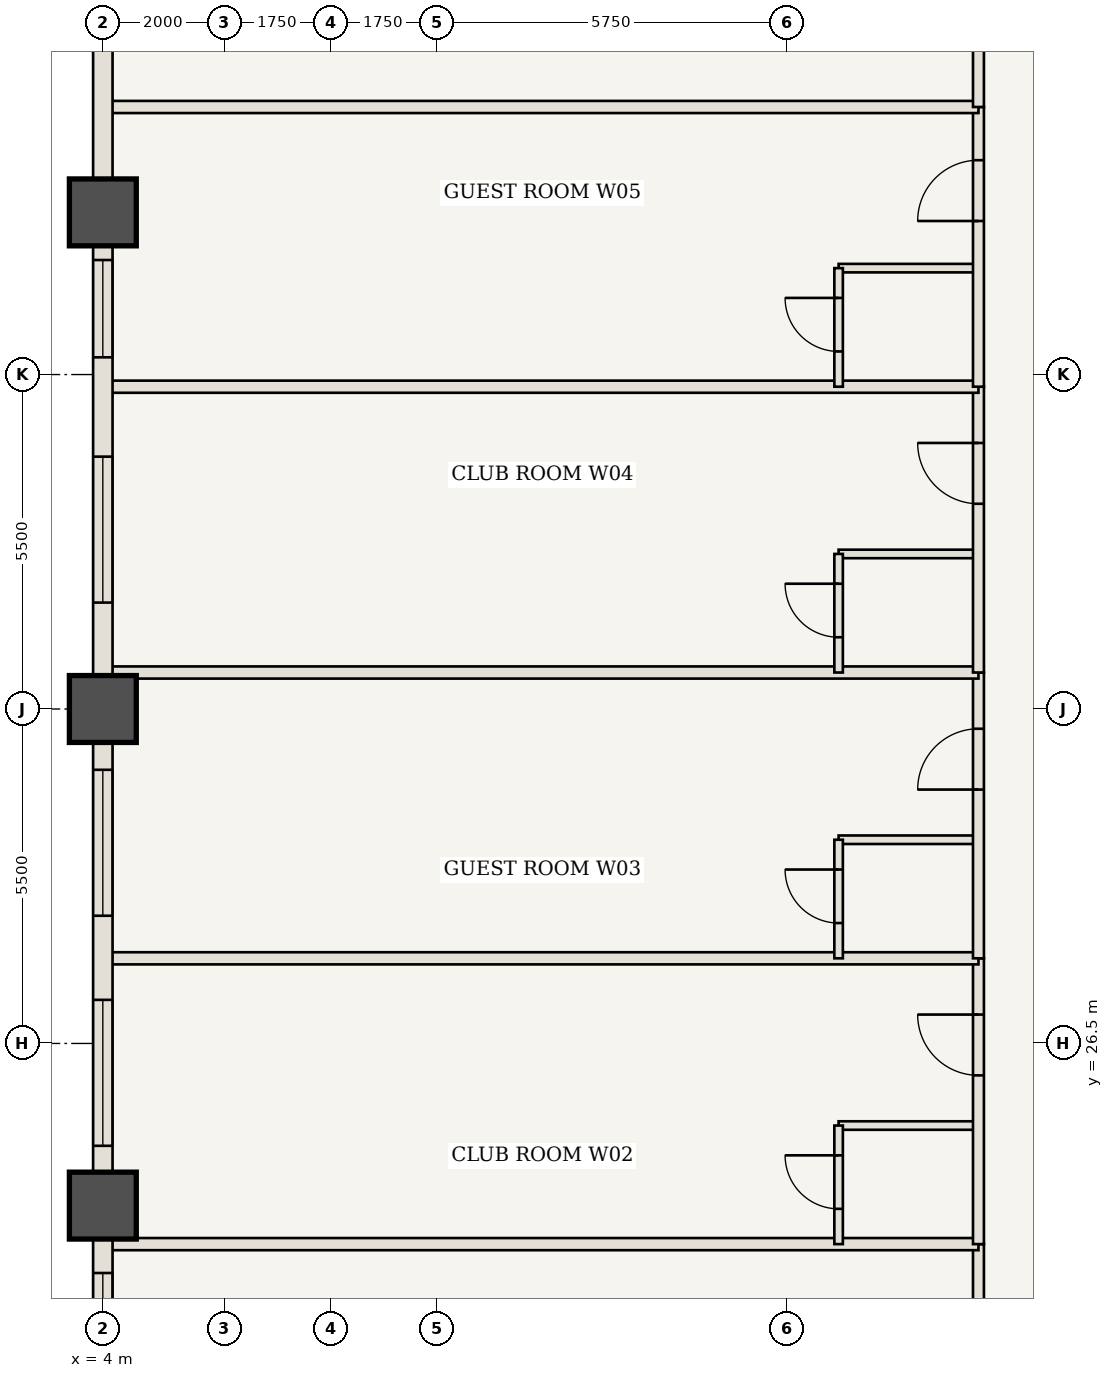
"""IFC4 building model, lengths in metres.
Left out: names, types, materials, properties, quantities, classifications, styles, units other than length and angle.
Written with IfcOpenShell. Run it as: python <this file> out.ifc"""

import sys

from ifc_helpers import new_model, si_unit, direction, frame, frame_2d, origin, origin_2d, place, context, subcontext, project, spatial, rectangle, extrude, element, fill, save


model = new_model("IFC4")
c1 = context("Model", 3, precision=1e-05, world=origin(), true_north=direction((0.0, 1.0)))
c2 = subcontext(c1, "Body", "Model", "MODEL_VIEW")
j1 = project(units=[si_unit("LENGTHUNIT", "METRE"), si_unit("PLANEANGLEUNIT", "RADIAN")], contexts=[c1])
p1 = place(None, origin())
s1 = spatial("IfcSite", under=j1, at=p1, CompositionType="ELEMENT")
p2 = place(p1, origin())
s2 = spatial("IfcBuilding", under=s1, at=p2, CompositionType="ELEMENT")
p3 = place(p2, frame((0.0, 0.0, 45.85)))
s3 = spatial("IfcBuildingStorey", under=s2, at=p3, CompositionType="ELEMENT", Elevation=45.85)
for number, where, z_axis, x_axis in (
    (1, (4.0, 23.833, 0.0), (0.0, 0.0, 1.0), (1.0, 0.0, 0.0)),
    (2, (4.0, 32.0, 0.0), (0.0, 0.0, 1.0), (1.0, 0.0, 0.0)),
    (3, (4.0, 40.167, 0.0), (0.0, 0.0, 1.0), (1.0, 0.0, 0.0)),
):
    element("IfcColumn", number, at=place(p3, frame(where, z_axis=z_axis, x_axis=x_axis)), inside=s3, PredefinedType="COLUMN", context=c2, shape_type="SweptSolid", body=[
        extrude(rectangle(XDim=1.1, YDim=1.1, at=origin_2d()), origin(), (0.0, 0.0, 1.0), 3.5),
    ])
p4 = place(p3, frame((18.4, 18.4, 0.0), z_axis=(0.0, 0.0, 1.0), x_axis=(0.0, 1.0, 0.0)))
e4 = element("IfcWall", 4, at=p4, inside=s3, PredefinedType="STANDARD", context=c2, shape_type="SweptSolid", body=[
    extrude(rectangle(XDim=4.8, YDim=0.18, at=frame_2d((2.4, 0.0))), origin(), (0.0, 0.0, 1.0), 3.32),
])
p5 = place(p4, frame((2.825, 0.0, 0.0)))
e5 = element("IfcOpeningElement", 5, at=p5, cuts=e4, PredefinedType="OPENING", context=c2, shape_type="SweptSolid", body=[
    extrude(rectangle(XDim=1.0, YDim=2.15, at=frame_2d((0.5, 1.075))), frame((0.0, 0.1, 0.0), z_axis=(0.0, -1.0, 0.0), x_axis=(1.0, 0.0, 0.0)), (0.0, 0.0, 1.0), 0.2),
])
p6 = place(p3, frame((4.06, 23.2, 0.0), z_axis=(0.0, 0.0, 1.0), x_axis=(1.0, 0.0, 0.0)))
e6 = element("IfcWall", 6, at=p6, inside=s3, PredefinedType="STANDARD", context=c2, shape_type="SweptSolid", body=[
    extrude(rectangle(XDim=14.34, YDim=0.2, at=frame_2d((7.17, 0.0))), origin(), (0.0, 0.0, 1.0), 3.32),
])
p7 = place(p3, frame((16.1, 25.15, 0.0), z_axis=(0.0, 0.0, 1.0), x_axis=(1.0, 0.0, 0.0)))
e7 = element("IfcWall", 7, at=p7, inside=s3, PredefinedType="STANDARD", context=c2, shape_type="SweptSolid", body=[
    extrude(rectangle(XDim=2.3, YDim=0.14, at=frame_2d((1.15, 0.0))), origin(), (0.0, 0.0, 1.0), 3.32),
])
p8 = place(p3, frame((16.1, 23.2, 0.0), z_axis=(0.0, 0.0, 1.0), x_axis=(0.0, 1.0, 0.0)))
e8 = element("IfcWall", 8, at=p8, inside=s3, PredefinedType="STANDARD", context=c2, shape_type="SweptSolid", body=[
    extrude(rectangle(XDim=1.95, YDim=0.14, at=frame_2d((0.975, 0.0))), origin(), (0.0, 0.0, 1.0), 3.32),
])
p9 = place(p8, frame((0.58, 0.0, 0.0)))
e9 = element("IfcOpeningElement", 9, at=p9, cuts=e8, PredefinedType="OPENING", context=c2, shape_type="SweptSolid", body=[
    extrude(rectangle(XDim=0.88, YDim=2.1, at=frame_2d((0.44, 1.05))), frame((0.0, 0.08, 0.0), z_axis=(0.0, -1.0, 0.0), x_axis=(1.0, 0.0, 0.0)), (0.0, 0.0, 1.0), 0.16),
])
p10 = place(p3, frame((18.4, 23.2, 0.0), z_axis=(0.0, 0.0, 1.0), x_axis=(0.0, 1.0, 0.0)))
e10 = element("IfcWall", 10, at=p10, inside=s3, PredefinedType="STANDARD", context=c2, shape_type="SweptSolid", body=[
    extrude(rectangle(XDim=4.7, YDim=0.18, at=frame_2d((2.35, 0.0))), origin(), (0.0, 0.0, 1.0), 3.32),
])
p11 = place(p10, frame((2.775, 0.0, 0.0)))
e11 = element("IfcOpeningElement", 11, at=p11, cuts=e10, PredefinedType="OPENING", context=c2, shape_type="SweptSolid", body=[
    extrude(rectangle(XDim=1.0, YDim=2.15, at=frame_2d((0.5, 1.075))), frame((0.0, 0.1, 0.0), z_axis=(0.0, -1.0, 0.0), x_axis=(1.0, 0.0, 0.0)), (0.0, 0.0, 1.0), 0.2),
])
p12 = place(p3, frame((4.06, 27.9, 0.0), z_axis=(0.0, 0.0, 1.0), x_axis=(1.0, 0.0, 0.0)))
e12 = element("IfcWall", 12, at=p12, inside=s3, PredefinedType="STANDARD", context=c2, shape_type="SweptSolid", body=[
    extrude(rectangle(XDim=14.34, YDim=0.2, at=frame_2d((7.17, 0.0))), origin(), (0.0, 0.0, 1.0), 3.32),
])
p13 = place(p3, frame((16.1, 29.85, 0.0), z_axis=(0.0, 0.0, 1.0), x_axis=(1.0, 0.0, 0.0)))
e13 = element("IfcWall", 13, at=p13, inside=s3, PredefinedType="STANDARD", context=c2, shape_type="SweptSolid", body=[
    extrude(rectangle(XDim=2.3, YDim=0.14, at=frame_2d((1.15, 0.0))), origin(), (0.0, 0.0, 1.0), 3.32),
])
p14 = place(p3, frame((16.1, 27.9, 0.0), z_axis=(0.0, 0.0, 1.0), x_axis=(0.0, 1.0, 0.0)))
e14 = element("IfcWall", 14, at=p14, inside=s3, PredefinedType="STANDARD", context=c2, shape_type="SweptSolid", body=[
    extrude(rectangle(XDim=1.95, YDim=0.14, at=frame_2d((0.975, 0.0))), origin(), (0.0, 0.0, 1.0), 3.32),
])
p15 = place(p14, frame((0.58, 0.0, 0.0)))
e15 = element("IfcOpeningElement", 15, at=p15, cuts=e14, PredefinedType="OPENING", context=c2, shape_type="SweptSolid", body=[
    extrude(rectangle(XDim=0.88, YDim=2.1, at=frame_2d((0.44, 1.05))), frame((0.0, 0.08, 0.0), z_axis=(0.0, -1.0, 0.0), x_axis=(1.0, 0.0, 0.0)), (0.0, 0.0, 1.0), 0.16),
])
p16 = place(p3, frame((18.4, 27.9, 0.0), z_axis=(0.0, 0.0, 1.0), x_axis=(0.0, 1.0, 0.0)))
e16 = element("IfcWall", 16, at=p16, inside=s3, PredefinedType="STANDARD", context=c2, shape_type="SweptSolid", body=[
    extrude(rectangle(XDim=4.7, YDim=0.18, at=frame_2d((2.35, 0.0))), origin(), (0.0, 0.0, 1.0), 3.32),
])
p17 = place(p16, frame((2.775, 0.0, 0.0)))
e17 = element("IfcOpeningElement", 17, at=p17, cuts=e16, PredefinedType="OPENING", context=c2, shape_type="SweptSolid", body=[
    extrude(rectangle(XDim=1.0, YDim=2.15, at=frame_2d((0.5, 1.075))), frame((0.0, 0.1, 0.0), z_axis=(0.0, -1.0, 0.0), x_axis=(1.0, 0.0, 0.0)), (0.0, 0.0, 1.0), 0.2),
])
p18 = place(p3, frame((4.06, 32.6, 0.0), z_axis=(0.0, 0.0, 1.0), x_axis=(1.0, 0.0, 0.0)))
e18 = element("IfcWall", 18, at=p18, inside=s3, PredefinedType="STANDARD", context=c2, shape_type="SweptSolid", body=[
    extrude(rectangle(XDim=14.34, YDim=0.2, at=frame_2d((7.17, 0.0))), origin(), (0.0, 0.0, 1.0), 3.32),
])
p19 = place(p3, frame((16.1, 34.55, 0.0), z_axis=(0.0, 0.0, 1.0), x_axis=(1.0, 0.0, 0.0)))
e19 = element("IfcWall", 19, at=p19, inside=s3, PredefinedType="STANDARD", context=c2, shape_type="SweptSolid", body=[
    extrude(rectangle(XDim=2.3, YDim=0.14, at=frame_2d((1.15, 0.0))), origin(), (0.0, 0.0, 1.0), 3.32),
])
p20 = place(p3, frame((16.1, 32.6, 0.0), z_axis=(0.0, 0.0, 1.0), x_axis=(0.0, 1.0, 0.0)))
e20 = element("IfcWall", 20, at=p20, inside=s3, PredefinedType="STANDARD", context=c2, shape_type="SweptSolid", body=[
    extrude(rectangle(XDim=1.95, YDim=0.14, at=frame_2d((0.975, 0.0))), origin(), (0.0, 0.0, 1.0), 3.32),
])
p21 = place(p20, frame((0.58, 0.0, 0.0)))
e21 = element("IfcOpeningElement", 21, at=p21, cuts=e20, PredefinedType="OPENING", context=c2, shape_type="SweptSolid", body=[
    extrude(rectangle(XDim=0.88, YDim=2.1, at=frame_2d((0.44, 1.05))), frame((0.0, 0.08, 0.0), z_axis=(0.0, -1.0, 0.0), x_axis=(1.0, 0.0, 0.0)), (0.0, 0.0, 1.0), 0.16),
])
p22 = place(p3, frame((18.4, 32.6, 0.0), z_axis=(0.0, 0.0, 1.0), x_axis=(0.0, 1.0, 0.0)))
e22 = element("IfcWall", 22, at=p22, inside=s3, PredefinedType="STANDARD", context=c2, shape_type="SweptSolid", body=[
    extrude(rectangle(XDim=4.7, YDim=0.18, at=frame_2d((2.35, 0.0))), origin(), (0.0, 0.0, 1.0), 3.32),
])
p23 = place(p22, frame((2.775, 0.0, 0.0)))
e23 = element("IfcOpeningElement", 23, at=p23, cuts=e22, PredefinedType="OPENING", context=c2, shape_type="SweptSolid", body=[
    extrude(rectangle(XDim=1.0, YDim=2.15, at=frame_2d((0.5, 1.075))), frame((0.0, 0.1, 0.0), z_axis=(0.0, -1.0, 0.0), x_axis=(1.0, 0.0, 0.0)), (0.0, 0.0, 1.0), 0.2),
])
p24 = place(p3, frame((4.06, 37.3, 0.0), z_axis=(0.0, 0.0, 1.0), x_axis=(1.0, 0.0, 0.0)))
e24 = element("IfcWall", 24, at=p24, inside=s3, PredefinedType="STANDARD", context=c2, shape_type="SweptSolid", body=[
    extrude(rectangle(XDim=14.34, YDim=0.2, at=frame_2d((7.17, 0.0))), origin(), (0.0, 0.0, 1.0), 3.32),
])
p25 = place(p3, frame((16.1, 39.25, 0.0), z_axis=(0.0, 0.0, 1.0), x_axis=(1.0, 0.0, 0.0)))
e25 = element("IfcWall", 25, at=p25, inside=s3, PredefinedType="STANDARD", context=c2, shape_type="SweptSolid", body=[
    extrude(rectangle(XDim=2.3, YDim=0.14, at=frame_2d((1.15, 0.0))), origin(), (0.0, 0.0, 1.0), 3.32),
])
p26 = place(p3, frame((16.1, 37.3, 0.0), z_axis=(0.0, 0.0, 1.0), x_axis=(0.0, 1.0, 0.0)))
e26 = element("IfcWall", 26, at=p26, inside=s3, PredefinedType="STANDARD", context=c2, shape_type="SweptSolid", body=[
    extrude(rectangle(XDim=1.95, YDim=0.14, at=frame_2d((0.975, 0.0))), origin(), (0.0, 0.0, 1.0), 3.32),
])
p27 = place(p26, frame((0.58, 0.0, 0.0)))
e27 = element("IfcOpeningElement", 27, at=p27, cuts=e26, PredefinedType="OPENING", context=c2, shape_type="SweptSolid", body=[
    extrude(rectangle(XDim=0.88, YDim=2.1, at=frame_2d((0.44, 1.05))), frame((0.0, 0.08, 0.0), z_axis=(0.0, -1.0, 0.0), x_axis=(1.0, 0.0, 0.0)), (0.0, 0.0, 1.0), 0.16),
])
p28 = place(p3, frame((18.4, 37.3, 0.0), z_axis=(0.0, 0.0, 1.0), x_axis=(0.0, 1.0, 0.0)))
e28 = element("IfcWall", 28, at=p28, inside=s3, PredefinedType="STANDARD", context=c2, shape_type="SweptSolid", body=[
    extrude(rectangle(XDim=4.6, YDim=0.18, at=frame_2d((2.3, 0.0))), origin(), (0.0, 0.0, 1.0), 3.32),
])
p29 = place(p28, frame((2.725, 0.0, 0.0)))
e29 = element("IfcOpeningElement", 29, at=p29, cuts=e28, PredefinedType="OPENING", context=c2, shape_type="SweptSolid", body=[
    extrude(rectangle(XDim=1.0, YDim=2.15, at=frame_2d((0.5, 1.075))), frame((0.0, 0.1, 0.0), z_axis=(0.0, -1.0, 0.0), x_axis=(1.0, 0.0, 0.0)), (0.0, 0.0, 1.0), 0.2),
])
p30 = place(p3, frame((4.06, 41.9, 0.0), z_axis=(0.0, 0.0, 1.0), x_axis=(1.0, 0.0, 0.0)))
e30 = element("IfcWall", 30, at=p30, inside=s3, PredefinedType="STANDARD", context=c2, shape_type="SweptSolid", body=[
    extrude(rectangle(XDim=14.34, YDim=0.2, at=frame_2d((7.17, 0.0))), origin(), (0.0, 0.0, 1.0), 3.32),
])
p31 = place(p3, frame((18.4, 41.9, 0.0), z_axis=(0.0, 0.0, 1.0), x_axis=(0.0, 1.0, 0.0)))
e31 = element("IfcWall", 31, at=p31, inside=s3, PredefinedType="STANDARD", context=c2, shape_type="SweptSolid", body=[
    extrude(rectangle(XDim=3.7, YDim=0.18, at=frame_2d((1.85, 0.0))), origin(), (0.0, 0.0, 1.0), 3.32),
])
p32 = place(p31, frame((1.35, 0.0, 0.0)))
e32 = element("IfcOpeningElement", 32, at=p32, cuts=e31, PredefinedType="OPENING", context=c2, shape_type="SweptSolid", body=[
    extrude(rectangle(XDim=1.0, YDim=2.15, at=frame_2d((0.5, 1.075))), frame((0.0, 0.1, 0.0), z_axis=(0.0, -1.0, 0.0), x_axis=(1.0, 0.0, 0.0)), (0.0, 0.0, 1.0), 0.2),
])
p33 = place(p3, frame((4.0, 15.667, 0.0), z_axis=(0.0, 0.0, 1.0), x_axis=(0.0, 1.0, 0.0)))
e33 = element("IfcWall", 33, at=p33, inside=s3, PredefinedType="USERDEFINED", context=c2, shape_type="SweptSolid", body=[
    extrude(rectangle(XDim=8.167, YDim=0.32, at=frame_2d((4.083, 0.0))), origin(), (0.0, 0.0, 1.0), 2.52),
])
p34 = place(p33, frame((0.742, 0.0, 0.85)))
e34 = element("IfcOpeningElement", 34, at=p34, cuts=e33, PredefinedType="OPENING", context=c2, shape_type="SweptSolid", body=[
    extrude(rectangle(XDim=2.8, YDim=1.47, at=frame_2d((1.4, 0.735))), frame((0.0, 0.17, 0.0), z_axis=(0.0, -1.0, 0.0), x_axis=(1.0, 0.0, 0.0)), (0.0, 0.0, 1.0), 0.34),
])
p35 = place(p33, frame((4.658, 0.0, 0.85)))
e35 = element("IfcOpeningElement", 35, at=p35, cuts=e33, PredefinedType="OPENING", context=c2, shape_type="SweptSolid", body=[
    extrude(rectangle(XDim=2.4, YDim=1.47, at=frame_2d((1.2, 0.735))), frame((0.0, 0.17, 0.0), z_axis=(0.0, -1.0, 0.0), x_axis=(1.0, 0.0, 0.0)), (0.0, 0.0, 1.0), 0.34),
])
p36 = place(p3, frame((4.0, 23.833, 0.0), z_axis=(0.0, 0.0, 1.0), x_axis=(0.0, 1.0, 0.0)))
e36 = element("IfcWall", 36, at=p36, inside=s3, PredefinedType="USERDEFINED", context=c2, shape_type="SweptSolid", body=[
    extrude(rectangle(XDim=8.167, YDim=0.32, at=frame_2d((4.083, 0.0))), origin(), (0.0, 0.0, 1.0), 2.52),
])
p37 = place(p36, frame((0.983, 0.0, 0.85)))
e37 = element("IfcOpeningElement", 37, at=p37, cuts=e36, PredefinedType="OPENING", context=c2, shape_type="SweptSolid", body=[
    extrude(rectangle(XDim=2.4, YDim=1.47, at=frame_2d((1.2, 0.735))), frame((0.0, 0.17, 0.0), z_axis=(0.0, -1.0, 0.0), x_axis=(1.0, 0.0, 0.0)), (0.0, 0.0, 1.0), 0.34),
])
p38 = place(p36, frame((4.767, 0.0, 0.85)))
e38 = element("IfcOpeningElement", 38, at=p38, cuts=e36, PredefinedType="OPENING", context=c2, shape_type="SweptSolid", body=[
    extrude(rectangle(XDim=2.4, YDim=1.47, at=frame_2d((1.2, 0.735))), frame((0.0, 0.17, 0.0), z_axis=(0.0, -1.0, 0.0), x_axis=(1.0, 0.0, 0.0)), (0.0, 0.0, 1.0), 0.34),
])
p39 = place(p3, frame((4.0, 32.0, 0.0), z_axis=(0.0, 0.0, 1.0), x_axis=(0.0, 1.0, 0.0)))
e39 = element("IfcWall", 39, at=p39, inside=s3, PredefinedType="USERDEFINED", context=c2, shape_type="SweptSolid", body=[
    extrude(rectangle(XDim=8.167, YDim=0.32, at=frame_2d((4.083, 0.0))), origin(), (0.0, 0.0, 1.0), 2.52),
])
p40 = place(p39, frame((1.75, 0.0, 0.85)))
e40 = element("IfcOpeningElement", 40, at=p40, cuts=e39, PredefinedType="OPENING", context=c2, shape_type="SweptSolid", body=[
    extrude(rectangle(XDim=2.4, YDim=1.47, at=frame_2d((1.2, 0.735))), frame((0.0, 0.17, 0.0), z_axis=(0.0, -1.0, 0.0), x_axis=(1.0, 0.0, 0.0)), (0.0, 0.0, 1.0), 0.34),
])
p41 = place(p39, frame((5.783, 0.0, 0.85)))
e41 = element("IfcOpeningElement", 41, at=p41, cuts=e39, PredefinedType="OPENING", context=c2, shape_type="SweptSolid", body=[
    extrude(rectangle(XDim=1.6, YDim=1.47, at=frame_2d((0.8, 0.735))), frame((0.0, 0.17, 0.0), z_axis=(0.0, -1.0, 0.0), x_axis=(1.0, 0.0, 0.0)), (0.0, 0.0, 1.0), 0.34),
])
p42 = place(p3, frame((4.0, 40.167, 0.0), z_axis=(0.0, 0.0, 1.0), x_axis=(0.0, 1.0, 0.0)))
e42 = element("IfcWall", 42, at=p42, inside=s3, PredefinedType="USERDEFINED", context=c2, shape_type="SweptSolid", body=[
    extrude(rectangle(XDim=8.167, YDim=0.32, at=frame_2d((4.083, 0.0))), origin(), (0.0, 0.0, 1.0), 2.52),
])
p43 = place(p42, frame((4.625, 0.0, 0.85)))
e43 = element("IfcOpeningElement", 43, at=p43, cuts=e42, PredefinedType="OPENING", context=c2, shape_type="SweptSolid", body=[
    extrude(rectangle(XDim=2.8, YDim=1.47, at=frame_2d((1.4, 0.735))), frame((0.0, 0.17, 0.0), z_axis=(0.0, -1.0, 0.0), x_axis=(1.0, 0.0, 0.0)), (0.0, 0.0, 1.0), 0.34),
])
p44 = place(p9, origin())
e44 = element("IfcDoor", 44, at=p44, inside=s3, OperationType="SINGLE_SWING_RIGHT", PredefinedType="DOOR", context=c2, shape_type="SweptSolid", body=[
    extrude(rectangle(XDim=0.88, YDim=2.1, at=frame_2d((0.44, 1.05))), frame((0.0, 0.025, 0.0), z_axis=(0.0, -1.0, 0.0), x_axis=(1.0, 0.0, 0.0)), (0.0, 0.0, 1.0), 0.05),
])
fill(e9, e44)
p45 = place(p11, origin())
e45 = element("IfcDoor", 45, at=p45, inside=s3, OperationType="SINGLE_SWING_RIGHT", PredefinedType="DOOR", context=c2, shape_type="SweptSolid", body=[
    extrude(rectangle(XDim=1.0, YDim=2.15, at=frame_2d((0.5, 1.075))), frame((0.0, 0.025, 0.0), z_axis=(0.0, -1.0, 0.0), x_axis=(1.0, 0.0, 0.0)), (0.0, 0.0, 1.0), 0.05),
])
fill(e11, e45)
p46 = place(p15, origin())
e46 = element("IfcDoor", 46, at=p46, inside=s3, OperationType="SINGLE_SWING_RIGHT", PredefinedType="DOOR", context=c2, shape_type="SweptSolid", body=[
    extrude(rectangle(XDim=0.88, YDim=2.1, at=frame_2d((0.44, 1.05))), frame((0.0, 0.025, 0.0), z_axis=(0.0, -1.0, 0.0), x_axis=(1.0, 0.0, 0.0)), (0.0, 0.0, 1.0), 0.05),
])
fill(e15, e46)
p47 = place(p17, origin())
e47 = element("IfcDoor", 47, at=p47, inside=s3, OperationType="SINGLE_SWING_LEFT", PredefinedType="DOOR", context=c2, shape_type="SweptSolid", body=[
    extrude(rectangle(XDim=1.0, YDim=2.15, at=frame_2d((0.5, 1.075))), frame((0.0, 0.025, 0.0), z_axis=(0.0, -1.0, 0.0), x_axis=(1.0, 0.0, 0.0)), (0.0, 0.0, 1.0), 0.05),
])
fill(e17, e47)
p48 = place(p21, origin())
e48 = element("IfcDoor", 48, at=p48, inside=s3, OperationType="SINGLE_SWING_RIGHT", PredefinedType="DOOR", context=c2, shape_type="SweptSolid", body=[
    extrude(rectangle(XDim=0.88, YDim=2.1, at=frame_2d((0.44, 1.05))), frame((0.0, 0.025, 0.0), z_axis=(0.0, -1.0, 0.0), x_axis=(1.0, 0.0, 0.0)), (0.0, 0.0, 1.0), 0.05),
])
fill(e21, e48)
p49 = place(p23, origin())
e49 = element("IfcDoor", 49, at=p49, inside=s3, OperationType="SINGLE_SWING_RIGHT", PredefinedType="DOOR", context=c2, shape_type="SweptSolid", body=[
    extrude(rectangle(XDim=1.0, YDim=2.15, at=frame_2d((0.5, 1.075))), frame((0.0, 0.025, 0.0), z_axis=(0.0, -1.0, 0.0), x_axis=(1.0, 0.0, 0.0)), (0.0, 0.0, 1.0), 0.05),
])
fill(e23, e49)
p50 = place(p27, origin())
e50 = element("IfcDoor", 50, at=p50, inside=s3, OperationType="SINGLE_SWING_RIGHT", PredefinedType="DOOR", context=c2, shape_type="SweptSolid", body=[
    extrude(rectangle(XDim=0.88, YDim=2.1, at=frame_2d((0.44, 1.05))), frame((0.0, 0.025, 0.0), z_axis=(0.0, -1.0, 0.0), x_axis=(1.0, 0.0, 0.0)), (0.0, 0.0, 1.0), 0.05),
])
fill(e27, e50)
p51 = place(p29, origin())
e51 = element("IfcDoor", 51, at=p51, inside=s3, OperationType="SINGLE_SWING_LEFT", PredefinedType="DOOR", context=c2, shape_type="SweptSolid", body=[
    extrude(rectangle(XDim=1.0, YDim=2.15, at=frame_2d((0.5, 1.075))), frame((0.0, 0.025, 0.0), z_axis=(0.0, -1.0, 0.0), x_axis=(1.0, 0.0, 0.0)), (0.0, 0.0, 1.0), 0.05),
])
fill(e29, e51)
p52 = place(p35, origin())
e52 = element("IfcWindow", 52, at=p52, inside=s3, PartitioningType="SINGLE_PANEL", PredefinedType="WINDOW", context=c2, shape_type="SweptSolid", body=[
    extrude(rectangle(XDim=2.4, YDim=1.47, at=frame_2d((1.2, 0.735))), frame((0.0, 0.03, 0.0), z_axis=(0.0, -1.0, 0.0), x_axis=(1.0, 0.0, 0.0)), (0.0, 0.0, 1.0), 0.06),
])
fill(e35, e52)
p53 = place(p37, origin())
e53 = element("IfcWindow", 53, at=p53, inside=s3, PartitioningType="SINGLE_PANEL", PredefinedType="WINDOW", context=c2, shape_type="SweptSolid", body=[
    extrude(rectangle(XDim=2.4, YDim=1.47, at=frame_2d((1.2, 0.735))), frame((0.0, 0.03, 0.0), z_axis=(0.0, -1.0, 0.0), x_axis=(1.0, 0.0, 0.0)), (0.0, 0.0, 1.0), 0.06),
])
fill(e37, e53)
p54 = place(p38, origin())
e54 = element("IfcWindow", 54, at=p54, inside=s3, PartitioningType="SINGLE_PANEL", PredefinedType="WINDOW", context=c2, shape_type="SweptSolid", body=[
    extrude(rectangle(XDim=2.4, YDim=1.47, at=frame_2d((1.2, 0.735))), frame((0.0, 0.03, 0.0), z_axis=(0.0, -1.0, 0.0), x_axis=(1.0, 0.0, 0.0)), (0.0, 0.0, 1.0), 0.06),
])
fill(e38, e54)
p55 = place(p40, origin())
e55 = element("IfcWindow", 55, at=p55, inside=s3, PartitioningType="SINGLE_PANEL", PredefinedType="WINDOW", context=c2, shape_type="SweptSolid", body=[
    extrude(rectangle(XDim=2.4, YDim=1.47, at=frame_2d((1.2, 0.735))), frame((0.0, 0.03, 0.0), z_axis=(0.0, -1.0, 0.0), x_axis=(1.0, 0.0, 0.0)), (0.0, 0.0, 1.0), 0.06),
])
fill(e40, e55)
p56 = place(p41, origin())
e56 = element("IfcWindow", 56, at=p56, inside=s3, PartitioningType="SINGLE_PANEL", PredefinedType="WINDOW", context=c2, shape_type="SweptSolid", body=[
    extrude(rectangle(XDim=1.6, YDim=1.47, at=frame_2d((0.8, 0.735))), frame((0.0, 0.03, 0.0), z_axis=(0.0, -1.0, 0.0), x_axis=(1.0, 0.0, 0.0)), (0.0, 0.0, 1.0), 0.06),
])
fill(e41, e56)
save(model, sys.argv[1])
